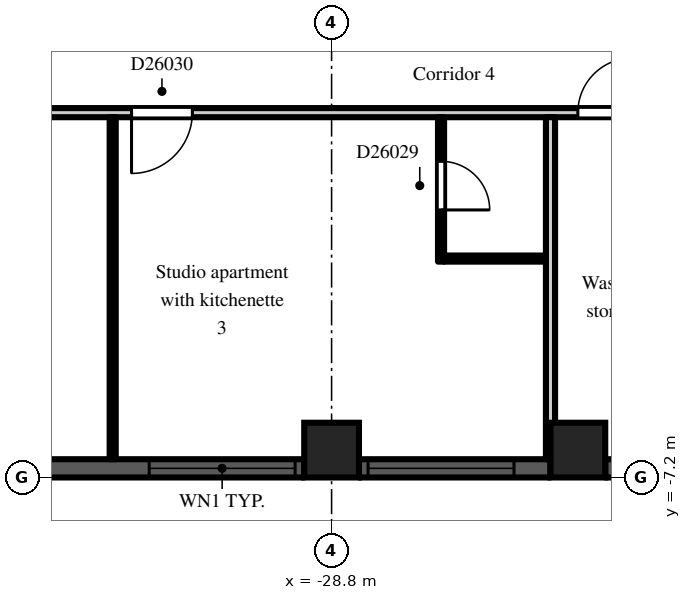
"""IFC4 building model, lengths in metres.
Left out: names, types, materials, properties, quantities, classifications, styles, units other than length and angle.
Written with IfcOpenShell. Run it as: python <this file> out.ifc"""

import sys

from ifc_helpers import new_model, si_unit, direction, frame, frame_2d, origin, origin_2d, place, context, subcontext, project, spatial, rectangle, extrude, element, fill, save


model = new_model("IFC4")
c1 = context("Model", 3, precision=1e-05, world=origin(), true_north=direction((0.0, 1.0)))
c2 = subcontext(c1, "Body", "Model", "MODEL_VIEW")
j1 = project(units=[si_unit("LENGTHUNIT", "METRE"), si_unit("PLANEANGLEUNIT", "RADIAN")], contexts=[c1])
p1 = place(None, origin())
s1 = spatial("IfcSite", under=j1, at=p1, CompositionType="ELEMENT")
p2 = place(p1, origin())
s2 = spatial("IfcBuilding", under=s1, at=p2, CompositionType="ELEMENT")
p3 = place(p2, frame((0.0, 0.0, 179.7)))
s3 = spatial("IfcBuildingStorey", under=s2, at=p3, CompositionType="ELEMENT", Elevation=179.7)
for number, where, z_axis, x_axis in (
    (1, (-28.8, -6.75, 0.0), (0.0, 0.0, 1.0), (1.0, 0.0, 0.0)),
    (2, (-24.75, -6.75, 0.0), (0.0, 0.0, 1.0), (1.0, 0.0, 0.0)),
):
    element("IfcColumn", number, at=place(p3, frame(where, z_axis=z_axis, x_axis=x_axis)), inside=s3, PredefinedType="COLUMN", context=c2, shape_type="SweptSolid", body=[
        extrude(rectangle(XDim=0.9, YDim=0.9, at=origin_2d()), origin(), (0.0, 0.0, 1.0), 3.0),
    ])
p4 = place(p3, frame((-35.55, -7.05, 0.0), z_axis=(0.0, 0.0, 1.0), x_axis=(1.0, 0.0, 0.0)))
e3 = element("IfcWall", 3, at=p4, inside=s3, PredefinedType="SOLIDWALL", context=c2, shape_type="SweptSolid", body=[
    extrude(rectangle(XDim=6.3, YDim=0.3, at=frame_2d((3.15, 0.0))), origin(), (0.0, 0.0, 1.0), 2.2),
])
p5 = place(p4, frame((3.75, 0.0, 0.2)))
e4 = element("IfcOpeningElement", 4, at=p5, cuts=e3, PredefinedType="OPENING", context=c2, shape_type="SweptSolid", body=[
    extrude(rectangle(XDim=2.4, YDim=1.85, at=frame_2d((1.2, 0.925))), frame((0.0, 0.16, 0.0), z_axis=(0.0, -1.0, 0.0), x_axis=(1.0, 0.0, 0.0)), (0.0, 0.0, 1.0), 0.32),
])
p6 = place(p3, frame((-28.35, -7.05, 0.0), z_axis=(0.0, 0.0, 1.0), x_axis=(1.0, 0.0, 0.0)))
e5 = element("IfcWall", 5, at=p6, inside=s3, PredefinedType="SOLIDWALL", context=c2, shape_type="SweptSolid", body=[
    extrude(rectangle(XDim=3.15, YDim=0.3, at=frame_2d((1.575, 0.0))), origin(), (0.0, 0.0, 1.0), 2.2),
])
p7 = place(p6, frame((0.15, 0.0, 0.2)))
e6 = element("IfcOpeningElement", 6, at=p7, cuts=e5, PredefinedType="OPENING", context=c2, shape_type="SweptSolid", body=[
    extrude(rectangle(XDim=2.4, YDim=1.85, at=frame_2d((1.2, 0.925))), frame((0.0, 0.16, 0.0), z_axis=(0.0, -1.0, 0.0), x_axis=(1.0, 0.0, 0.0)), (0.0, 0.0, 1.0), 0.32),
])
p8 = place(p3, frame((-24.3, -7.05, 0.0), z_axis=(0.0, 0.0, 1.0), x_axis=(1.0, 0.0, 0.0)))
e7 = element("IfcWall", 7, at=p8, inside=s3, PredefinedType="SOLIDWALL", context=c2, shape_type="SweptSolid", body=[
    extrude(rectangle(XDim=2.7, YDim=0.3, at=frame_2d((1.35, 0.0))), origin(), (0.0, 0.0, 1.0), 2.2),
])
p9 = place(p3, frame((-36.5, -1.2, 0.0), z_axis=(0.0, 0.0, 1.0), x_axis=(1.0, 0.0, 0.0)))
e8 = element("IfcWall", 8, at=p9, inside=s3, PredefinedType="PARTITIONING", context=c2, shape_type="SweptSolid", body=[
    extrude(rectangle(XDim=14.9, YDim=0.15, at=frame_2d((7.45, 0.0))), origin(), (0.0, 0.0, 1.0), 2.6),
])
p10 = place(p9, frame((13.55, 0.0, 0.0)))
e9 = element("IfcOpeningElement", 9, at=p10, cuts=e8, PredefinedType="OPENING", context=c2, shape_type="SweptSolid", body=[
    extrude(rectangle(XDim=0.9, YDim=2.1, at=frame_2d((0.45, 1.05))), frame((0.0, 0.085, 0.0), z_axis=(0.0, -1.0, 0.0), x_axis=(1.0, 0.0, 0.0)), (0.0, 0.0, 1.0), 0.17),
])
p11 = place(p9, frame((11.75, 0.0, 0.0)))
e10 = element("IfcOpeningElement", 10, at=p11, cuts=e8, PredefinedType="OPENING", context=c2, shape_type="SweptSolid", body=[
    extrude(rectangle(XDim=0.9, YDim=2.1, at=frame_2d((0.45, 1.05))), frame((0.0, 0.085, 0.0), z_axis=(0.0, -1.0, 0.0), x_axis=(1.0, 0.0, 0.0)), (0.0, 0.0, 1.0), 0.17),
])
p12 = place(p9, frame((4.41, 0.0, 0.0)))
e11 = element("IfcOpeningElement", 11, at=p12, cuts=e8, PredefinedType="OPENING", context=c2, shape_type="SweptSolid", body=[
    extrude(rectangle(XDim=1.0, YDim=2.1, at=frame_2d((0.5, 1.05))), frame((0.0, 0.085, 0.0), z_axis=(0.0, -1.0, 0.0), x_axis=(1.0, 0.0, 0.0)), (0.0, 0.0, 1.0), 0.17),
])
p13 = place(p9, frame((1.15, 0.0, 0.0)))
e12 = element("IfcOpeningElement", 12, at=p13, cuts=e8, PredefinedType="OPENING", context=c2, shape_type="SweptSolid", body=[
    extrude(rectangle(XDim=1.8, YDim=2.1, at=frame_2d((0.9, 1.05))), frame((0.0, 0.085, 0.0), z_axis=(0.0, -1.0, 0.0), x_axis=(1.0, 0.0, 0.0)), (0.0, 0.0, 1.0), 0.17),
])
p14 = place(p3, frame((-32.4, -6.9, 0.0), z_axis=(0.0, 0.0, 1.0), x_axis=(0.0, 1.0, 0.0)))
e13 = element("IfcWall", 13, at=p14, inside=s3, PredefinedType="PARTITIONING", context=c2, shape_type="SweptSolid", body=[
    extrude(rectangle(XDim=5.625, YDim=0.1, at=frame_2d((2.812, 0.0))), origin(), (0.0, 0.0, 1.0), 2.6),
])
p15 = place(p3, frame((-27.0, -3.65, 0.0), z_axis=(0.0, 0.0, 1.0), x_axis=(0.0, 1.0, 0.0)))
e14 = element("IfcWall", 14, at=p15, inside=s3, PredefinedType="PARTITIONING", context=c2, shape_type="SweptSolid", body=[
    extrude(rectangle(XDim=2.375, YDim=0.1, at=frame_2d((1.188, 0.0))), origin(), (0.0, 0.0, 1.0), 2.6),
])
p16 = place(p15, frame((0.85, 0.0, 0.0)))
e15 = element("IfcOpeningElement", 15, at=p16, cuts=e14, PredefinedType="OPENING", context=c2, shape_type="SweptSolid", body=[
    extrude(rectangle(XDim=0.8, YDim=2.1, at=frame_2d((0.4, 1.05))), frame((0.0, 0.06, 0.0), z_axis=(0.0, -1.0, 0.0), x_axis=(1.0, 0.0, 0.0)), (0.0, 0.0, 1.0), 0.12),
])
p17 = place(p3, frame((-26.95, -3.6, 0.0), z_axis=(0.0, 0.0, 1.0), x_axis=(1.0, 0.0, 0.0)))
e16 = element("IfcWall", 16, at=p17, inside=s3, PredefinedType="PARTITIONING", context=c2, shape_type="SweptSolid", body=[
    extrude(rectangle(XDim=1.675, YDim=0.1, at=frame_2d((0.837, 0.0))), origin(), (0.0, 0.0, 1.0), 2.6),
])
p18 = place(p3, frame((-25.2, -6.9, 0.0), z_axis=(0.0, 0.0, 1.0), x_axis=(0.0, 1.0, 0.0)))
e17 = element("IfcWall", 17, at=p18, inside=s3, PredefinedType="PARTITIONING", context=c2, shape_type="SweptSolid", body=[
    extrude(rectangle(XDim=5.625, YDim=0.15, at=frame_2d((2.812, 0.0))), origin(), (0.0, 0.0, 1.0), 2.6),
])
p19 = place(p5, origin())
e18 = element("IfcWindow", 18, at=p19, inside=s3, PartitioningType="SINGLE_PANEL", PredefinedType="WINDOW", context=c2, shape_type="SweptSolid", body=[
    extrude(rectangle(XDim=2.4, YDim=1.85, at=frame_2d((1.2, 0.925))), frame((0.0, 0.03, 0.0), z_axis=(0.0, -1.0, 0.0), x_axis=(1.0, 0.0, 0.0)), (0.0, 0.0, 1.0), 0.06),
])
fill(e4, e18)
p20 = place(p7, origin())
e19 = element("IfcWindow", 19, at=p20, inside=s3, PartitioningType="SINGLE_PANEL", PredefinedType="WINDOW", context=c2, shape_type="SweptSolid", body=[
    extrude(rectangle(XDim=2.4, YDim=1.85, at=frame_2d((1.2, 0.925))), frame((0.0, 0.03, 0.0), z_axis=(0.0, -1.0, 0.0), x_axis=(1.0, 0.0, 0.0)), (0.0, 0.0, 1.0), 0.06),
])
fill(e6, e19)
p21 = place(p11, origin())
e20 = element("IfcDoor", 20, at=p21, inside=s3, OperationType="SINGLE_SWING_RIGHT", PredefinedType="DOOR", context=c2, shape_type="SweptSolid", body=[
    extrude(rectangle(XDim=0.9, YDim=2.1, at=frame_2d((0.45, 1.05))), frame((0.0, 0.025, 0.0), z_axis=(0.0, -1.0, 0.0), x_axis=(1.0, 0.0, 0.0)), (0.0, 0.0, 1.0), 0.05),
])
fill(e10, e20)
p22 = place(p16, frame((0.8, 0.0, 0.0), z_axis=(0.0, 0.0, 1.0), x_axis=(-1.0, 0.0, 0.0)))
e21 = element("IfcDoor", 21, at=p22, inside=s3, OperationType="SINGLE_SWING_RIGHT", PredefinedType="DOOR", context=c2, shape_type="SweptSolid", body=[
    extrude(rectangle(XDim=0.8, YDim=2.1, at=frame_2d((0.4, 1.05))), frame((0.0, 0.025, 0.0), z_axis=(0.0, -1.0, 0.0), x_axis=(1.0, 0.0, 0.0)), (0.0, 0.0, 1.0), 0.05),
])
fill(e15, e21)
p23 = place(p12, frame((1.0, 0.0, 0.0), z_axis=(0.0, 0.0, 1.0), x_axis=(-1.0, 0.0, 0.0)))
e22 = element("IfcDoor", 22, at=p23, inside=s3, OperationType="SINGLE_SWING_RIGHT", PredefinedType="DOOR", context=c2, shape_type="SweptSolid", body=[
    extrude(rectangle(XDim=1.0, YDim=2.1, at=frame_2d((0.5, 1.05))), frame((0.0, 0.025, 0.0), z_axis=(0.0, -1.0, 0.0), x_axis=(1.0, 0.0, 0.0)), (0.0, 0.0, 1.0), 0.05),
])
fill(e11, e22)
save(model, sys.argv[1])
